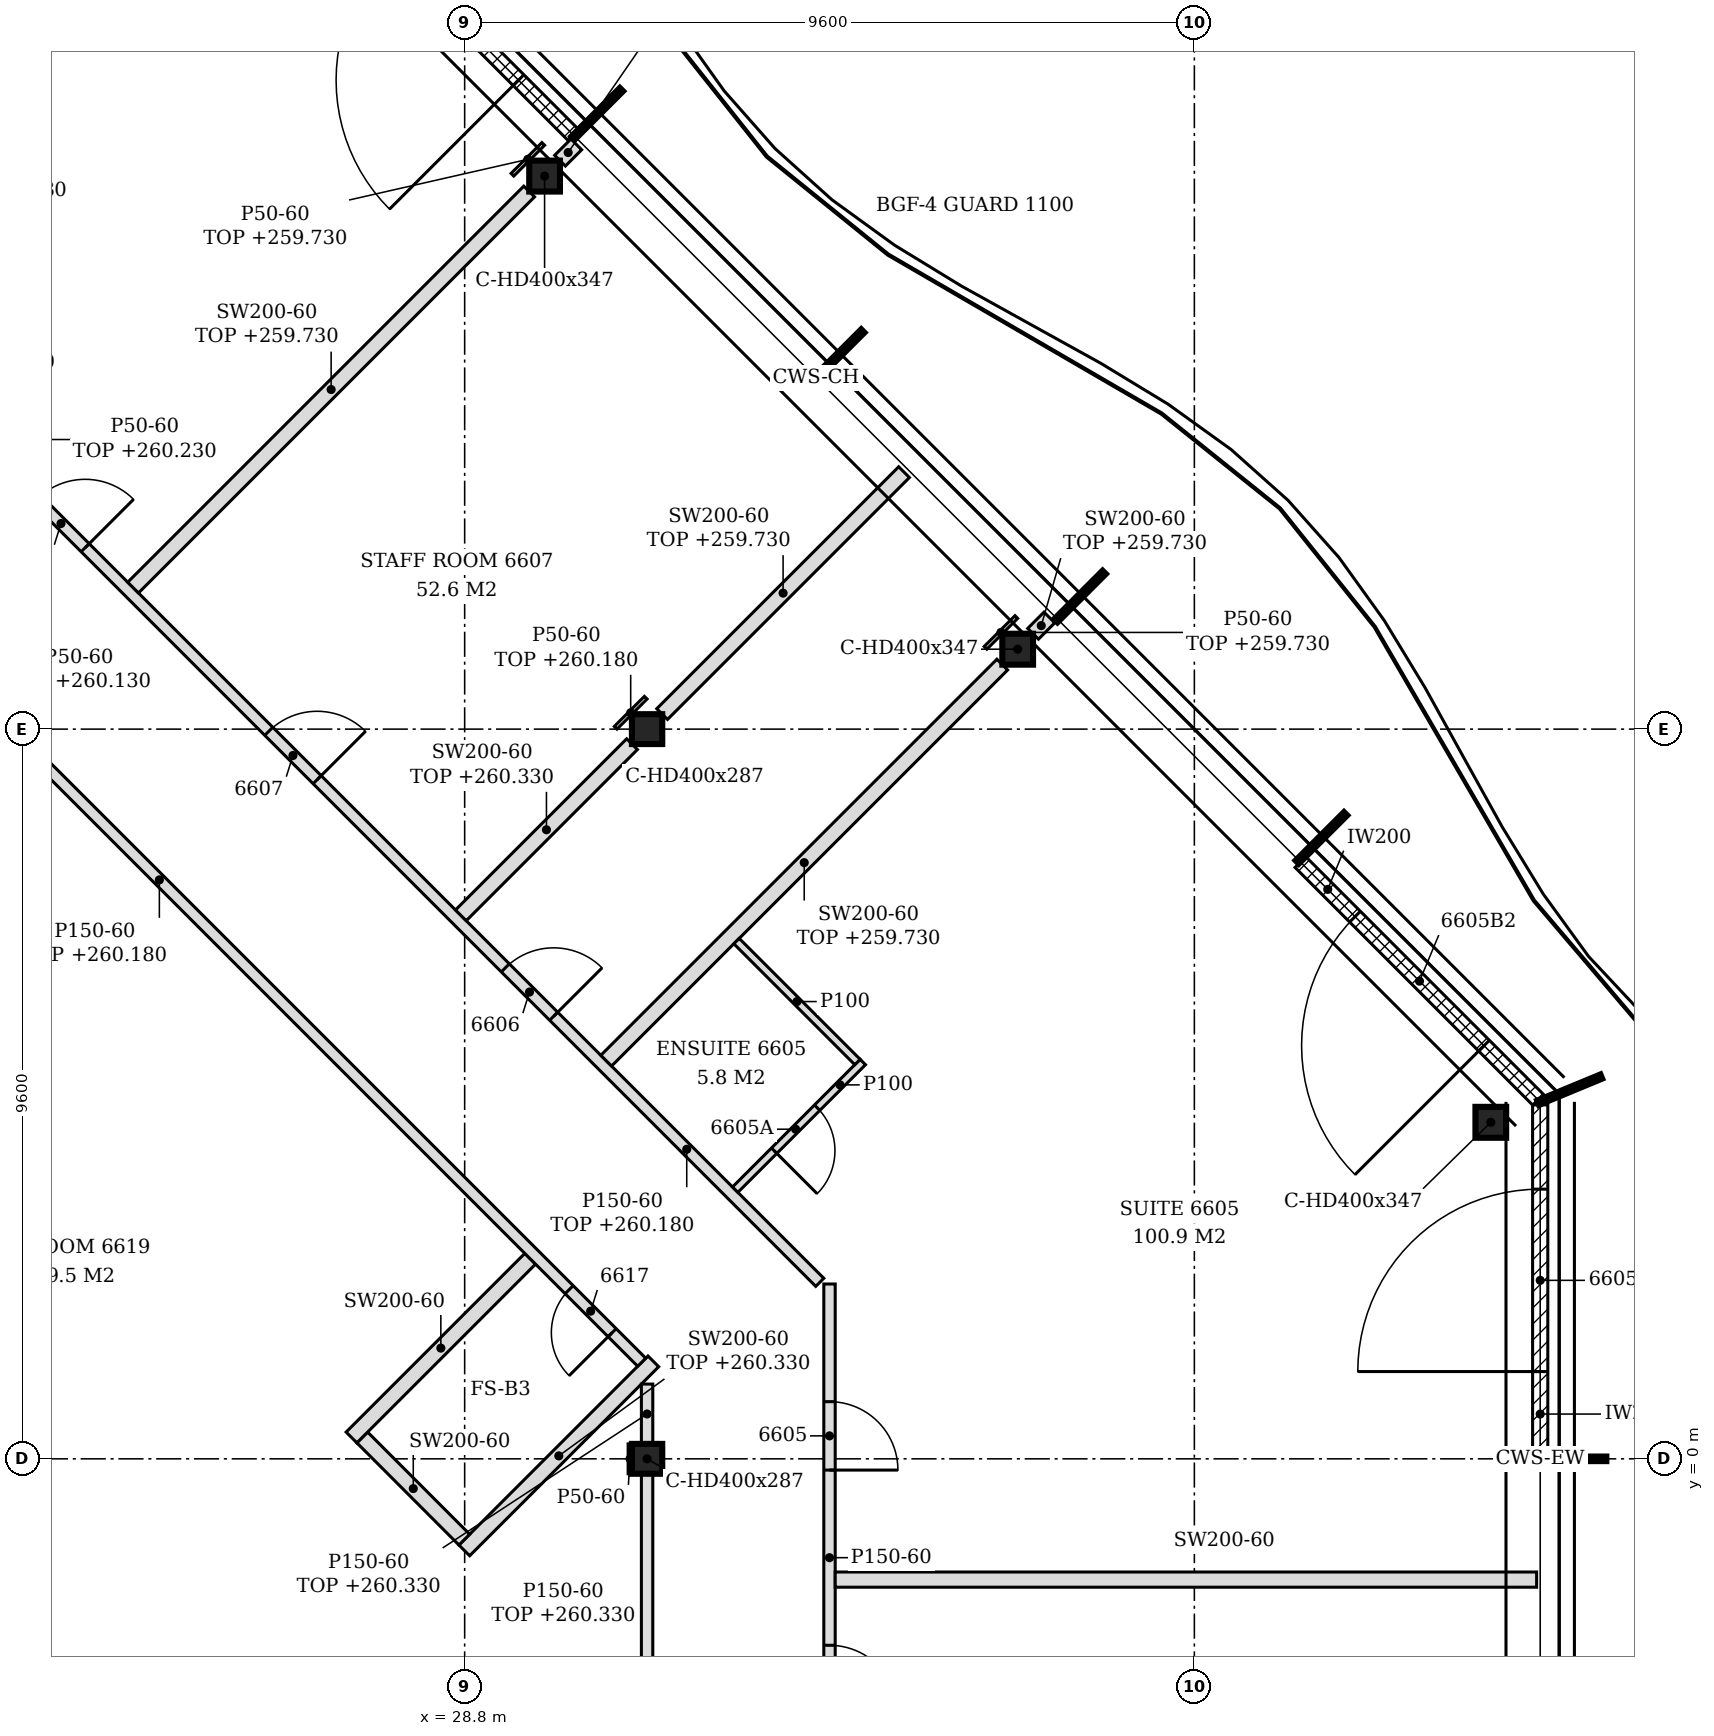
"""IFC4 building model, lengths in metres.
Left out: names, types, materials, properties, quantities, classifications, styles, units other than length and angle.
Written with IfcOpenShell. Run it as: python <this file> out.ifc"""

import sys

from ifc_helpers import new_model, si_unit, direction, frame, frame_2d, origin, origin_2d, place, context, subcontext, project, spatial, polyline, rectangle, i_section, outline, extrude, clip, halfspace, element, fill, save


model = new_model("IFC4")
c1 = context("Model", 3, precision=1e-05, world=origin(), true_north=direction((0.0, 1.0)))
c2 = subcontext(c1, "Body", "Model", "MODEL_VIEW")
j1 = project(units=[si_unit("LENGTHUNIT", "METRE"), si_unit("PLANEANGLEUNIT", "RADIAN")], contexts=[c1])
p1 = place(None, origin())
s1 = spatial("IfcSite", under=j1, at=p1, CompositionType="ELEMENT")
p2 = place(p1, origin())
s2 = spatial("IfcBuilding", under=s1, at=p2, CompositionType="ELEMENT")
p3 = place(p2, frame((0.0, 0.0, 257.4)))
s3 = spatial("IfcBuildingStorey", under=s2, at=p3, CompositionType="ELEMENT", Elevation=257.4)
for number, where, z_axis, x_axis in (
    (1, (42.3, 4.427, -0.15), (0.0, 0.0, 1.0), (1.0, 0.0, 0.0)),
    (2, (36.076, 10.652, -0.15), (0.0, 0.0, 1.0), (1.0, 0.0, 0.0)),
    (3, (29.852, 16.876, -0.15), (0.0, 0.0, 1.0), (1.0, 0.0, 0.0)),
):
    element("IfcColumn", number, at=place(p3, frame(where, z_axis=z_axis, x_axis=x_axis)), inside=s3, PredefinedType="COLUMN", context=c2, shape_type="Clipping", body=[
        clip(extrude(i_section(OverallWidth=0.404, OverallDepth=0.407, WebThickness=0.027, FlangeThickness=0.044, FilletRadius=0.015, at=origin_2d()), origin(), (0.0, 0.0, 1.0), 3.5), halfspace(frame((0.0, 0.0, 3.05), z_axis=(0.0, 0.0, 1.0), x_axis=(1.0, 0.0, 0.0)), False)),
    ])
for number, where, z_axis, x_axis in (
    (4, (31.2, 0.0, -0.15), (0.0, 0.0, 1.0), (1.0, 0.0, 0.0)),
    (5, (31.2, 9.6, -0.15), (0.0, 0.0, 1.0), (1.0, 0.0, 0.0)),
):
    element("IfcColumn", number, at=place(p3, frame(where, z_axis=z_axis, x_axis=x_axis)), inside=s3, PredefinedType="COLUMN", context=c2, shape_type="SweptSolid", body=[
        extrude(i_section(OverallWidth=0.399, OverallDepth=0.393, WebThickness=0.023, FlangeThickness=0.037, FilletRadius=0.015, at=origin_2d()), origin(), (0.0, 0.0, 1.0), 3.5),
    ])
p4 = place(p3, frame((42.95, 0.03, 0.0), z_axis=(0.0, 0.0, 1.0), x_axis=(0.0, 1.0, 0.0)))
e6 = element("IfcWall", 6, at=p4, inside=s3, PredefinedType="NOTDEFINED", context=c2, shape_type="SweptSolid", body=[
    extrude(rectangle(XDim=4.626, YDim=0.2, at=frame_2d((2.313, 0.0))), origin(), (0.0, 0.0, 1.0), 3.35),
])
p5 = place(p4, frame((1.118, 0.0, 0.0)))
e7 = element("IfcOpeningElement", 7, at=p5, cuts=e6, PredefinedType="OPENING", context=c2, shape_type="SweptSolid", body=[
    extrude(rectangle(XDim=2.4, YDim=2.4, at=frame_2d((1.2, 1.2))), frame((0.0, 0.11, 0.0), z_axis=(0.0, -1.0, 0.0), x_axis=(1.0, 0.0, 0.0)), (0.0, 0.0, 1.0), 0.22),
])
p6 = place(p3, frame((42.922, 4.725, 0.0), z_axis=(0.0, 0.0, 1.0), x_axis=(-0.707079168996, 0.707134392299, 0.0)))
e8 = element("IfcWall", 8, at=p6, inside=s3, PredefinedType="NOTDEFINED", context=c2, shape_type="SweptSolid", body=[
    extrude(rectangle(XDim=4.421, YDim=0.2, at=frame_2d((2.21, 0.0))), origin(), (0.0, 0.0, 1.0), 3.35),
])
p7 = place(p6, frame((1.005, 0.0, 0.0)))
e9 = element("IfcOpeningElement", 9, at=p7, cuts=e8, PredefinedType="OPENING", context=c2, shape_type="SweptSolid", body=[
    extrude(rectangle(XDim=2.4, YDim=2.33, at=frame_2d((1.2, 1.165))), frame((0.0, 0.11, 0.0), z_axis=(0.0, -1.0, 0.0), x_axis=(1.0, 0.0, 0.0)), (0.0, 0.0, 1.0), 0.22),
])
p8 = place(p3, frame((30.226, 17.42, 0.0), z_axis=(0.0, 0.0, 1.0), x_axis=(-0.707079231393, 0.707134329907, 0.0)))
e10 = element("IfcWall", 10, at=p8, inside=s3, PredefinedType="NOTDEFINED", context=c2, shape_type="SweptSolid", body=[
    extrude(rectangle(XDim=4.431, YDim=0.2, at=frame_2d((2.215, 0.0))), origin(), (0.0, 0.0, 1.0), 3.35),
])
p9 = place(p8, frame((1.015, 0.0, 0.0)))
e11 = element("IfcOpeningElement", 11, at=p9, cuts=e10, PredefinedType="OPENING", context=c2, shape_type="SweptSolid", body=[
    extrude(rectangle(XDim=2.4, YDim=2.4, at=frame_2d((1.2, 1.2))), frame((0.0, 0.11, 0.0), z_axis=(0.0, -1.0, 0.0), x_axis=(1.0, 0.0, 0.0)), (0.0, 0.0, 1.0), 0.22),
])
p10 = place(p3, frame((33.6, -4.037, 0.0), z_axis=(0.0, 0.0, 1.0), x_axis=(0.0, 1.0, 0.0)))
e12 = element("IfcWall", 12, at=p10, inside=s3, PredefinedType="PARTITIONING", context=c2, shape_type="SweptSolid", body=[
    extrude(rectangle(XDim=6.337, YDim=0.15, at=frame_2d((3.168, 0.0))), origin(), (0.0, 0.0, 1.0), 3.35),
])
p11 = place(p10, frame((0.684, 0.0, 0.0)))
e13 = element("IfcOpeningElement", 13, at=p11, cuts=e12, PredefinedType="OPENING", context=c2, shape_type="SweptSolid", body=[
    extrude(rectangle(XDim=0.9, YDim=2.1, at=frame_2d((0.45, 1.05))), frame((0.0, 0.085, 0.0), z_axis=(0.0, -1.0, 0.0), x_axis=(1.0, 0.0, 0.0)), (0.0, 0.0, 1.0), 0.17),
])
p12 = place(p10, frame((3.889, 0.0, 0.0)))
e14 = element("IfcOpeningElement", 14, at=p12, cuts=e12, PredefinedType="OPENING", context=c2, shape_type="SweptSolid", body=[
    extrude(rectangle(XDim=0.9, YDim=2.1, at=frame_2d((0.45, 1.05))), frame((0.0, 0.085, 0.0), z_axis=(0.0, -1.0, 0.0), x_axis=(1.0, 0.0, 0.0)), (0.0, 0.0, 1.0), 0.17),
])
p13 = place(p3, frame((31.2, -3.043, 0.0), z_axis=(0.0, 0.0, 1.0), x_axis=(0.0, 1.0, 0.0)))
e15 = element("IfcWall", 15, at=p13, inside=s3, PredefinedType="PARTITIONING", context=c2, shape_type="SweptSolid", body=[
    extrude(rectangle(XDim=2.846, YDim=0.15, at=frame_2d((1.423, 0.0))), origin(), (0.0, 0.0, 1.0), 2.93),
])
p14 = place(p3, frame((33.675, -1.589, 0.0), z_axis=(0.0, 0.0, 1.0), x_axis=(1.0, 0.0, 0.0)))
e16 = element("IfcWall", 16, at=p14, inside=s3, PredefinedType="PARTITIONING", context=c2, shape_type="SweptSolid", body=[
    extrude(outline(polyline([(0.0, 0.0), (9.228, 0.0), (9.228, 3.35), (9.125, 3.35), (9.123, 2.33), (8.125, 2.33), (8.123, 3.35), (0.0, 3.35), (0.0, 0.0)])), frame((0.0, 0.1, 0.0), z_axis=(0.0, -1.0, 0.0), x_axis=(1.0, 0.0, 0.0)), (0.0, 0.0, 1.0), 0.2),
])
p15 = place(p3, frame((28.795, -1.205, 0.0), z_axis=(0.0, 0.0, 1.0), x_axis=(0.707106781187, 0.707106781187, 0.0)))
e17 = element("IfcWall", 17, at=p15, inside=s3, PredefinedType="PARTITIONING", context=c2, shape_type="SweptSolid", body=[
    extrude(rectangle(XDim=3.517, YDim=0.2, at=frame_2d((1.758, 0.0))), origin(), (0.0, 0.0, 1.0), 2.93),
])
p16 = place(p3, frame((28.795, -1.063, 0.0), z_axis=(0.0, 0.0, 1.0), x_axis=(-0.706656947409, 0.707556328979, 0.0)))
e18 = element("IfcWall", 18, at=p16, inside=s3, PredefinedType="PARTITIONING", context=c2, shape_type="SweptSolid", body=[
    extrude(rectangle(XDim=1.9, YDim=0.2, at=frame_2d((0.95, 0.0))), origin(), (0.0, 0.0, 1.0), 3.35),
])
p17 = place(p3, frame((31.2, 0.197, 0.0), z_axis=(0.0, 0.0, 1.0), x_axis=(0.0, 1.0, 0.0)))
e19 = element("IfcWall", 19, at=p17, inside=s3, PredefinedType="PARTITIONING", context=c2, shape_type="SweptSolid", body=[
    extrude(rectangle(XDim=0.787, YDim=0.15, at=frame_2d((0.394, 0.0))), origin(), (0.0, 0.0, 1.0), 2.93),
])
p18 = place(p3, frame((27.311, 0.281, 0.0), z_axis=(0.0, 0.0, 1.0), x_axis=(0.707106781187, 0.707106781187, 0.0)))
e20 = element("IfcWall", 20, at=p18, inside=s3, PredefinedType="PARTITIONING", context=c2, shape_type="SweptSolid", body=[
    extrude(rectangle(XDim=3.324, YDim=0.2, at=frame_2d((1.662, 0.0))), origin(), (0.0, 0.0, 1.0), 3.35),
])
p19 = place(p3, frame((31.129, 1.271, 0.0), z_axis=(0.0, 0.0, 1.0), x_axis=(-0.707114135277, 0.70709942702, 0.0)))
e21 = element("IfcWall", 21, at=p19, inside=s3, PredefinedType="PARTITIONING", context=c2, shape_type="SweptSolid", body=[
    extrude(rectangle(XDim=16.599, YDim=0.15, at=frame_2d((8.299, 0.0))), origin(), (0.0, 0.0, 1.0), 2.78),
])
p20 = place(p19, frame((0.55, 0.0, 0.0)))
e22 = element("IfcOpeningElement", 22, at=p20, cuts=e21, PredefinedType="OPENING", context=c2, shape_type="SweptSolid", body=[
    extrude(rectangle(XDim=0.8, YDim=2.1, at=frame_2d((0.4, 1.05))), frame((0.0, 0.085, 0.0), z_axis=(0.0, -1.0, 0.0), x_axis=(1.0, 0.0, 0.0)), (0.0, 0.0, 1.0), 0.17),
])
p21 = place(p3, frame((33.472, 2.322, 0.0), z_axis=(0.0, 0.0, 1.0), x_axis=(-0.707106781187, 0.707106781187, 0.0)))
e23 = element("IfcWall", 23, at=p21, inside=s3, PredefinedType="PARTITIONING", context=c2, shape_type="SweptSolid", body=[
    extrude(rectangle(XDim=15.203, YDim=0.15, at=frame_2d((7.602, 0.0))), origin(), (0.0, 0.0, 1.0), 2.78),
])
p22 = place(p21, frame((4.951, 0.0, 0.0)))
e24 = element("IfcOpeningElement", 24, at=p22, cuts=e23, PredefinedType="OPENING", context=c2, shape_type="SweptSolid", body=[
    extrude(rectangle(XDim=0.9, YDim=2.1, at=frame_2d((0.45, 1.05))), frame((0.0, 0.085, 0.0), z_axis=(0.0, -1.0, 0.0), x_axis=(1.0, 0.0, 0.0)), (0.0, 0.0, 1.0), 0.17),
])
p23 = place(p21, frame((9.352, 0.0, 0.0)))
e25 = element("IfcOpeningElement", 25, at=p23, cuts=e23, PredefinedType="OPENING", context=c2, shape_type="SweptSolid", body=[
    extrude(rectangle(XDim=0.9, YDim=2.1, at=frame_2d((0.45, 1.05))), frame((0.0, 0.085, 0.0), z_axis=(0.0, -1.0, 0.0), x_axis=(1.0, 0.0, 0.0)), (0.0, 0.0, 1.0), 0.17),
])
p24 = place(p21, frame((13.668, 0.0, 0.0)))
e26 = element("IfcOpeningElement", 26, at=p24, cuts=e23, PredefinedType="OPENING", context=c2, shape_type="SweptSolid", body=[
    extrude(rectangle(XDim=0.9, YDim=2.1, at=frame_2d((0.45, 1.05))), frame((0.0, 0.085, 0.0), z_axis=(0.0, -1.0, 0.0), x_axis=(1.0, 0.0, 0.0)), (0.0, 0.0, 1.0), 0.17),
])
p25 = place(p3, frame((32.359, 3.541, 0.0), z_axis=(0.0, 0.0, 1.0), x_axis=(0.707158179099, 0.707055379538, 0.0)))
e27 = element("IfcWall", 27, at=p25, inside=s3, PredefinedType="PARTITIONING", context=c2, shape_type="SweptSolid", body=[
    extrude(rectangle(XDim=2.375, YDim=0.1, at=frame_2d((1.188, 0.0))), origin(), (0.0, 0.0, 1.0), 3.35),
])
p26 = place(p25, frame((0.725, 0.0, 0.0)))
e28 = element("IfcOpeningElement", 28, at=p26, cuts=e27, PredefinedType="OPENING", context=c2, shape_type="SweptSolid", body=[
    extrude(rectangle(XDim=0.8, YDim=2.1, at=frame_2d((0.4, 1.05))), frame((0.0, 0.06, 0.0), z_axis=(0.0, -1.0, 0.0), x_axis=(1.0, 0.0, 0.0)), (0.0, 0.0, 1.0), 0.12),
])
p27 = place(p3, frame((30.662, 5.238, 0.0), z_axis=(0.0, 0.0, 1.0), x_axis=(0.707106781187, 0.707106781187, 0.0)))
e29 = element("IfcWall", 29, at=p27, inside=s3, PredefinedType="PARTITIONING", context=c2, shape_type="SweptSolid", body=[
    extrude(rectangle(XDim=7.369, YDim=0.2, at=frame_2d((3.685, 0.0))), origin(), (0.0, 0.0, 1.0), 2.33),
])
p28 = place(p3, frame((33.968, 5.22, 0.0), z_axis=(0.0, 0.0, 1.0), x_axis=(-0.707106781187, 0.707106781187, 0.0)))
e30 = element("IfcWall", 30, at=p28, inside=s3, PredefinedType="PARTITIONING", context=c2, shape_type="SweptSolid", body=[
    extrude(rectangle(XDim=2.25, YDim=0.1, at=frame_2d((1.125, 0.0))), origin(), (0.0, 0.0, 1.0), 3.35),
])
p29 = place(p3, frame((28.75, 7.15, 0.0), z_axis=(0.0, 0.0, 1.0), x_axis=(0.7070684525, 0.707145107796, 0.0)))
e31 = element("IfcWall", 31, at=p29, inside=s3, PredefinedType="PARTITIONING", context=c2, shape_type="SweptSolid", body=[
    extrude(rectangle(XDim=3.185, YDim=0.2, at=frame_2d((1.592, 0.0))), origin(), (0.0, 0.0, 1.0), 2.93),
])
p30 = place(p3, frame((31.398, 9.798, 0.0), z_axis=(0.0, 0.0, 1.0), x_axis=(0.707133900936, 0.707079660397, 0.0)))
e32 = element("IfcWall", 32, at=p30, inside=s3, PredefinedType="PARTITIONING", context=c2, shape_type="SweptSolid", body=[
    extrude(rectangle(XDim=4.501, YDim=0.2, at=frame_2d((2.25, 0.0))), origin(), (0.0, 0.0, 1.0), 2.33),
])
p31 = place(p3, frame((36.278, 10.854, 0.0), z_axis=(0.0, 0.0, 1.0), x_axis=(0.707509117806, 0.706704215511, 0.0)))
e33 = element("IfcWall", 33, at=p31, inside=s3, PredefinedType="PARTITIONING", context=c2, shape_type="SweptSolid", body=[
    extrude(rectangle(XDim=0.303, YDim=0.2, at=frame_2d((0.152, 0.0))), origin(), (0.0, 0.0, 1.0), 2.33),
])
p32 = place(p3, frame((24.438, 11.462, 0.0), z_axis=(0.0, 0.0, 1.0), x_axis=(0.707090216072, 0.707123345913, 0.0)))
e34 = element("IfcWall", 34, at=p32, inside=s3, PredefinedType="PARTITIONING", context=c2, shape_type="SweptSolid", body=[
    extrude(rectangle(XDim=7.369, YDim=0.2, at=frame_2d((3.685, 0.0))), origin(), (0.0, 0.0, 1.0), 2.33),
])
p33 = place(p3, frame((30.054, 17.078, 0.0), z_axis=(0.0, 0.0, 1.0), x_axis=(0.707106781187, 0.707106781187, 0.0)))
e35 = element("IfcWall", 35, at=p33, inside=s3, PredefinedType="PARTITIONING", context=c2, shape_type="SweptSolid", body=[
    extrude(rectangle(XDim=0.303, YDim=0.2, at=frame_2d((0.152, 0.0))), origin(), (0.0, 0.0, 1.0), 2.33),
])
p34 = place(p3, frame((30.976, -0.197, 0.0), z_axis=(0.0, 0.0, 1.0), x_axis=(0.0, 1.0, 0.0)))
e36 = element("IfcWall", 36, at=p34, inside=s3, PredefinedType="PARTITIONING", context=c2, shape_type="SweptSolid", body=[
    extrude(rectangle(XDim=0.393, YDim=0.05, at=frame_2d((0.197, 0.0))), origin(), (0.0, 0.0, 1.0), 3.35),
])
p35 = place(p3, frame((35.653, 10.669, 0.0), z_axis=(0.0, 0.0, 1.0), x_axis=(0.707106781187, 0.707106781187, 0.0)))
e37 = element("IfcWall", 37, at=p35, inside=s3, PredefinedType="PARTITIONING", context=c2, shape_type="SweptSolid", body=[
    extrude(rectangle(XDim=0.573, YDim=0.05, at=frame_2d((0.287, 0.0))), origin(), (0.0, 0.0, 1.0), 2.33),
])
p36 = place(p3, frame((30.786, 9.618, 0.0), z_axis=(0.0, 0.0, 1.0), x_axis=(0.707106781187, 0.707106781187, 0.0)))
e38 = element("IfcWall", 38, at=p36, inside=s3, PredefinedType="PARTITIONING", context=c2, shape_type="SweptSolid", body=[
    extrude(rectangle(XDim=0.56, YDim=0.05, at=frame_2d((0.28, 0.0))), origin(), (0.0, 0.0, 1.0), 2.78),
])
p37 = place(p3, frame((29.428, 16.893, 0.0), z_axis=(0.0, 0.0, 1.0), x_axis=(0.707106781187, 0.707106781187, 0.0)))
e39 = element("IfcWall", 39, at=p37, inside=s3, PredefinedType="PARTITIONING", context=c2, shape_type="SweptSolid", body=[
    extrude(rectangle(XDim=0.573, YDim=0.05, at=frame_2d((0.287, 0.0))), origin(), (0.0, 0.0, 1.0), 2.33),
])
p38 = place(p5, origin())
e40 = element("IfcDoor", 40, at=p38, inside=s3, OperationType="SINGLE_SWING_LEFT", PredefinedType="DOOR", context=c2, shape_type="SweptSolid", body=[
    extrude(rectangle(XDim=2.4, YDim=2.4, at=frame_2d((1.2, 1.2))), frame((0.0, 0.025, 0.0), z_axis=(0.0, -1.0, 0.0), x_axis=(1.0, 0.0, 0.0)), (0.0, 0.0, 1.0), 0.05),
])
fill(e7, e40)
p39 = place(p7, origin())
e41 = element("IfcDoor", 41, at=p39, inside=s3, OperationType="SINGLE_SWING_LEFT", PredefinedType="DOOR", context=c2, shape_type="SweptSolid", body=[
    extrude(rectangle(XDim=2.4, YDim=2.33, at=frame_2d((1.2, 1.165))), frame((0.0, 0.025, 0.0), z_axis=(0.0, -1.0, 0.0), x_axis=(1.0, 0.0, 0.0)), (0.0, 0.0, 1.0), 0.05),
])
fill(e9, e41)
p40 = place(p9, origin())
e42 = element("IfcDoor", 42, at=p40, inside=s3, OperationType="SINGLE_SWING_LEFT", PredefinedType="DOOR", context=c2, shape_type="SweptSolid", body=[
    extrude(rectangle(XDim=2.4, YDim=2.4, at=frame_2d((1.2, 1.2))), frame((0.0, 0.025, 0.0), z_axis=(0.0, -1.0, 0.0), x_axis=(1.0, 0.0, 0.0)), (0.0, 0.0, 1.0), 0.05),
])
fill(e11, e42)
p41 = place(p11, frame((0.9, 0.0, 0.0), z_axis=(0.0, 0.0, 1.0), x_axis=(-1.0, 0.0, 0.0)))
e43 = element("IfcDoor", 43, at=p41, inside=s3, OperationType="SINGLE_SWING_RIGHT", PredefinedType="DOOR", context=c2, shape_type="SweptSolid", body=[
    extrude(rectangle(XDim=0.9, YDim=2.1, at=frame_2d((0.45, 1.05))), frame((0.0, 0.025, 0.0), z_axis=(0.0, -1.0, 0.0), x_axis=(1.0, 0.0, 0.0)), (0.0, 0.0, 1.0), 0.05),
])
fill(e13, e43)
p42 = place(p12, frame((0.9, 0.0, 0.0), z_axis=(0.0, 0.0, 1.0), x_axis=(-1.0, 0.0, 0.0)))
e44 = element("IfcDoor", 44, at=p42, inside=s3, OperationType="SINGLE_SWING_RIGHT", PredefinedType="DOOR", context=c2, shape_type="SweptSolid", body=[
    extrude(rectangle(XDim=0.9, YDim=2.1, at=frame_2d((0.45, 1.05))), frame((0.0, 0.025, 0.0), z_axis=(0.0, -1.0, 0.0), x_axis=(1.0, 0.0, 0.0)), (0.0, 0.0, 1.0), 0.05),
])
fill(e14, e44)
p43 = place(p26, frame((0.8, 0.0, 0.0), z_axis=(0.0, 0.0, 1.0), x_axis=(-1.0, 0.0, 0.0)))
e45 = element("IfcDoor", 45, at=p43, inside=s3, OperationType="SINGLE_SWING_RIGHT", PredefinedType="DOOR", context=c2, shape_type="SweptSolid", body=[
    extrude(rectangle(XDim=0.8, YDim=2.1, at=frame_2d((0.4, 1.05))), frame((0.0, 0.025, 0.0), z_axis=(0.0, -1.0, 0.0), x_axis=(1.0, 0.0, 0.0)), (0.0, 0.0, 1.0), 0.05),
])
fill(e28, e45)
p44 = place(p22, frame((0.9, 0.0, 0.0), z_axis=(0.0, 0.0, 1.0), x_axis=(-1.0, 0.0, 0.0)))
e46 = element("IfcDoor", 46, at=p44, inside=s3, OperationType="SINGLE_SWING_RIGHT", PredefinedType="DOOR", context=c2, shape_type="SweptSolid", body=[
    extrude(rectangle(XDim=0.9, YDim=2.1, at=frame_2d((0.45, 1.05))), frame((0.0, 0.025, 0.0), z_axis=(0.0, -1.0, 0.0), x_axis=(1.0, 0.0, 0.0)), (0.0, 0.0, 1.0), 0.05),
])
fill(e24, e46)
p45 = place(p23, frame((0.9, 0.0, 0.0), z_axis=(0.0, 0.0, 1.0), x_axis=(-1.0, 0.0, 0.0)))
e47 = element("IfcDoor", 47, at=p45, inside=s3, OperationType="SINGLE_SWING_RIGHT", PredefinedType="DOOR", context=c2, shape_type="SweptSolid", body=[
    extrude(rectangle(XDim=0.9, YDim=2.1, at=frame_2d((0.45, 1.05))), frame((0.0, 0.025, 0.0), z_axis=(0.0, -1.0, 0.0), x_axis=(1.0, 0.0, 0.0)), (0.0, 0.0, 1.0), 0.05),
])
fill(e25, e47)
p46 = place(p24, frame((0.9, 0.0, 0.0), z_axis=(0.0, 0.0, 1.0), x_axis=(-1.0, 0.0, 0.0)))
e48 = element("IfcDoor", 48, at=p46, inside=s3, OperationType="SINGLE_SWING_RIGHT", PredefinedType="DOOR", context=c2, shape_type="SweptSolid", body=[
    extrude(rectangle(XDim=0.9, YDim=2.1, at=frame_2d((0.45, 1.05))), frame((0.0, 0.025, 0.0), z_axis=(0.0, -1.0, 0.0), x_axis=(1.0, 0.0, 0.0)), (0.0, 0.0, 1.0), 0.05),
])
fill(e26, e48)
p47 = place(p20, origin())
e49 = element("IfcDoor", 49, at=p47, inside=s3, OperationType="SINGLE_SWING_LEFT", PredefinedType="DOOR", context=c2, shape_type="SweptSolid", body=[
    extrude(rectangle(XDim=0.8, YDim=2.1, at=frame_2d((0.4, 1.05))), frame((0.0, 0.025, 0.0), z_axis=(0.0, -1.0, 0.0), x_axis=(1.0, 0.0, 0.0)), (0.0, 0.0, 1.0), 0.05),
])
fill(e22, e49)
save(model, sys.argv[1])
